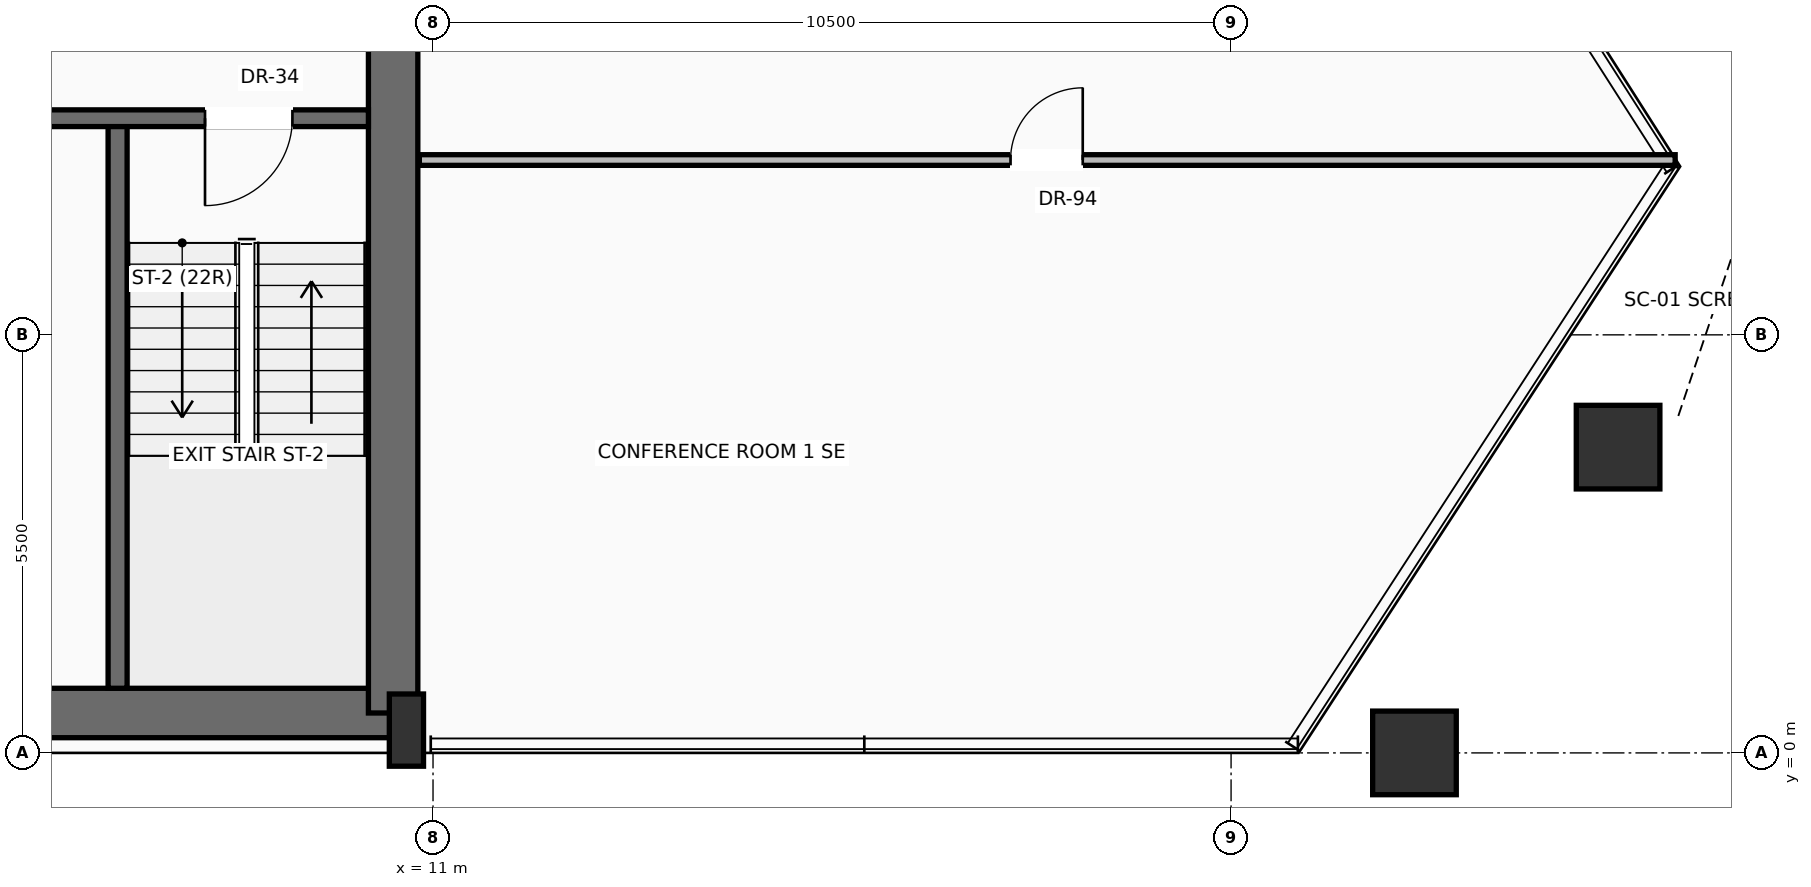
"""IFC4 building model, lengths in metres.
Left out: names, types, materials, properties, quantities, classifications, styles, units other than length and angle.
Written with IfcOpenShell. Run it as: python <this file> out.ifc"""

import sys

from ifc_helpers import new_model, si_unit, direction, frame, frame_2d, origin, origin_2d, place, context, subcontext, project, spatial, rectangle, hollow_rectangle, extrude, source, transform, mapped, element, fill, save


model = new_model("IFC4")
c1 = context("Model", 3, precision=1e-05, world=origin(), true_north=direction((0.0, 1.0)))
c2 = subcontext(c1, "Body", "Model", "MODEL_VIEW")
j1 = project(units=[si_unit("LENGTHUNIT", "METRE"), si_unit("PLANEANGLEUNIT", "RADIAN")], contexts=[c1])
p1 = place(None, origin())
s1 = spatial("IfcSite", under=j1, at=p1, CompositionType="ELEMENT")
p2 = place(p1, origin())
s2 = spatial("IfcBuilding", under=s1, at=p2, CompositionType="ELEMENT")
p3 = place(p2, frame((0.0, 0.0, 140.4)))
s3 = spatial("IfcBuildingStorey", under=s2, at=p3, CompositionType="ELEMENT", Elevation=140.4)
p4 = place(p3, frame((-10.65, 0.525, 0.0), z_axis=(0.0, 0.0, 1.0), x_axis=(1.0, 0.0, 0.0)))
e1 = element("IfcWall", 1, at=p4, inside=s3, PredefinedType="SHEAR", context=c2, shape_type="SweptSolid", body=[
    extrude(rectangle(XDim=21.3, YDim=0.65, at=frame_2d((10.65, 0.0))), origin(), (0.0, 0.0, 1.0), 3.47),
])
p5 = place(p3, frame((10.475, 0.525, 0.0), z_axis=(0.0, 0.0, 1.0), x_axis=(0.0, 1.0, 0.0)))
e2 = element("IfcWall", 2, at=p5, inside=s3, PredefinedType="SHEAR", context=c2, shape_type="SweptSolid", body=[
    extrude(rectangle(XDim=15.55, YDim=0.65, at=frame_2d((7.775, 0.0))), origin(), (0.0, 0.0, 1.0), 3.47),
])
m1 = source(origin(), c2, "Body", "SweptSolid", [
    extrude(rectangle(XDim=0.45, YDim=0.95, at=origin_2d()), origin(), (0.0, 0.0, 1.0), 3.7),
])
p6 = place(p3, frame((10.65, 0.3, 0.0), z_axis=(0.0, 0.0, 1.0), x_axis=(1.0, 0.0, 0.0)))
e3 = element("IfcColumn", 3, at=p6, inside=s3, PredefinedType="PILASTER", context=c2, shape_type="MappedRepresentation", body=[
    mapped(m1, transform((0.0, 0.0, 0.0), scale=1.0)),
])
m2 = source(origin(), c2, "Body", "SweptSolid", [
    extrude(hollow_rectangle(XDim=1.1, YDim=1.1, WallThickness=0.055, at=origin_2d()), origin(), (0.0, 0.0, 1.0), 3.692),
])
p7 = place(p3, frame((23.913, 0.0, 0.004), z_axis=(0.008729826062, 0.0, 0.999961894342), x_axis=(0.0, 1.0, 0.0)))
e4 = element("IfcColumn", 4, at=p7, inside=s3, PredefinedType="COLUMN", context=c2, shape_type="MappedRepresentation", body=[
    mapped(m2, transform((0.0, 0.0, 0.0), scale=1.0)),
])
m3 = source(origin(), c2, "Body", "SweptSolid", [
    extrude(hollow_rectangle(XDim=1.1, YDim=1.1, WallThickness=0.055, at=origin_2d()), origin(), (0.0, 0.0, 1.0), 3.692),
])
p8 = place(p3, frame((26.592, 4.023, 0.004), z_axis=(-0.003769374608, -0.015275886571, 0.999876211891), x_axis=(0.970879659482, -0.239567708184, 0.0)))
e5 = element("IfcColumn", 5, at=p8, inside=s3, PredefinedType="COLUMN", context=c2, shape_type="MappedRepresentation", body=[
    mapped(m3, transform((0.0, 0.0, 0.0), scale=1.0)),
])
p9 = place(p3, frame((6.85, 0.85, 0.0), z_axis=(0.0, 0.0, 1.0), x_axis=(0.0, 1.0, 0.0)))
e6 = element("IfcWall", 6, at=p9, inside=s3, PredefinedType="SOLIDWALL", context=c2, shape_type="SweptSolid", body=[
    extrude(rectangle(XDim=7.5, YDim=0.25, at=frame_2d((3.75, 0.0))), origin(), (0.0, 0.0, 1.0), 3.47),
])
p10 = place(p3, frame((10.15, 8.35, 0.0), z_axis=(0.0, 0.0, 1.0), x_axis=(-1.0, 0.0, 0.0)))
e7 = element("IfcWall", 7, at=p10, inside=s3, PredefinedType="SOLIDWALL", context=c2, shape_type="SweptSolid", body=[
    extrude(rectangle(XDim=4.65, YDim=0.22, at=frame_2d((2.325, 0.0))), origin(), (0.0, 0.0, 1.0), 3.47),
])
p11 = place(p10, frame((1.0, 0.0, 0.0)))
e8 = element("IfcOpeningElement", 8, at=p11, cuts=e7, PredefinedType="OPENING", context=c2, shape_type="SweptSolid", body=[
    extrude(rectangle(XDim=1.15, YDim=2.2, at=frame_2d((0.575, 1.1))), frame((0.0, 0.12, 0.0), z_axis=(0.0, -1.0, 0.0), x_axis=(1.0, 0.0, 0.0)), (0.0, 0.0, 1.0), 0.24),
])
p12 = place(p3, frame((10.82, 7.8, 0.0), z_axis=(0.0, 0.0, 1.0), x_axis=(1.0, 0.0, 0.0)))
e9 = element("IfcWall", 9, at=p12, inside=s3, PredefinedType="PARTITIONING", context=c2, shape_type="SweptSolid", body=[
    extrude(rectangle(XDim=16.523, YDim=0.14, at=frame_2d((8.261, 0.0))), origin(), (0.0, 0.0, 1.0), 3.462),
])
p13 = place(p12, frame((7.778, 0.0, 0.0)))
e10 = element("IfcOpeningElement", 10, at=p13, cuts=e9, PredefinedType="OPENING", context=c2, shape_type="SweptSolid", body=[
    extrude(rectangle(XDim=0.95, YDim=2.2, at=frame_2d((0.475, 1.1))), frame((0.0, 0.08, 0.0), z_axis=(0.0, -1.0, 0.0), x_axis=(1.0, 0.0, 0.0)), (0.0, 0.0, 1.0), 0.16),
])
m4 = source(origin(), c2, "Body", "SweptSolid", [
    extrude(rectangle(XDim=1.15, YDim=2.2, at=frame_2d((0.575, 1.1))), frame((0.0, 0.025, 0.0), z_axis=(0.0, -1.0, 0.0), x_axis=(1.0, 0.0, 0.0)), (0.0, 0.0, 1.0), 0.05),
])
p14 = place(p11, origin())
e11 = element("IfcDoor", 11, at=p14, inside=s3, OperationType="SINGLE_SWING_RIGHT", PredefinedType="DOOR", context=c2, shape_type="MappedRepresentation", body=[
    mapped(m4, transform((0.0, 0.0, 0.0), scale=1.0)),
])
fill(e8, e11)
m5 = source(origin(), c2, "Body", "SweptSolid", [
    extrude(rectangle(XDim=0.95, YDim=2.2, at=frame_2d((0.475, 1.1))), frame((0.0, 0.025, 0.0), z_axis=(0.0, -1.0, 0.0), x_axis=(1.0, 0.0, 0.0)), (0.0, 0.0, 1.0), 0.05),
])
p15 = place(p13, origin())
e12 = element("IfcDoor", 12, at=p15, inside=s3, OperationType="SINGLE_SWING_RIGHT", PredefinedType="DOOR", context=c2, shape_type="MappedRepresentation", body=[
    mapped(m5, transform((0.0, 0.0, 0.0), scale=1.0)),
])
fill(e10, e12)
save(model, sys.argv[1])
